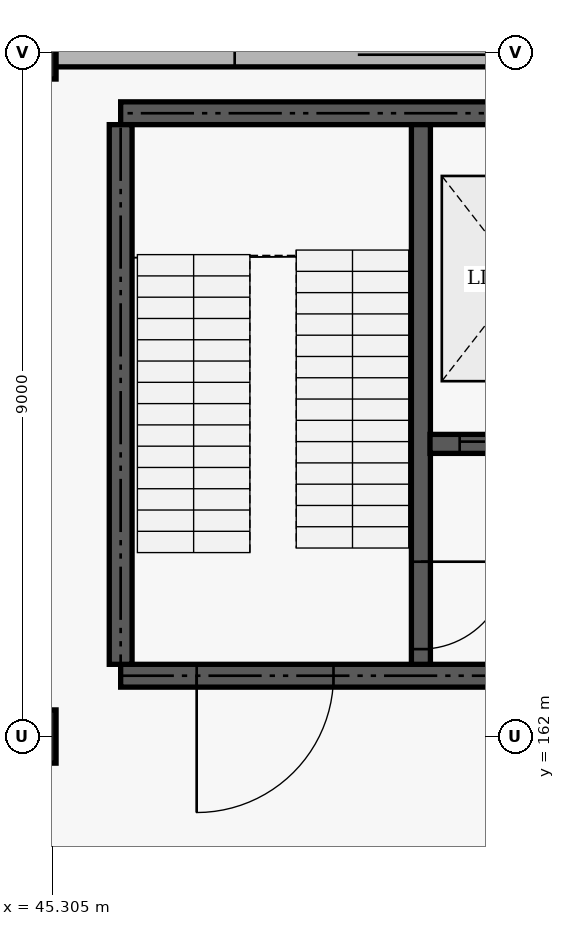
"""IFC4 building model, lengths in metres.
Left out: names, types, materials, properties, quantities, classifications, styles, units other than length and angle.
Written with IfcOpenShell. Run it as: python <this file> out.ifc"""

import sys

from ifc_helpers import new_model, si_unit, direction, frame, frame_2d, origin, origin_2d, place, context, subcontext, project, spatial, rectangle, extrude, element, fill, save


model = new_model("IFC4")
c1 = context("Model", 3, precision=1e-05, world=origin(), true_north=direction((0.0, 1.0)))
c2 = subcontext(c1, "Body", "Model", "MODEL_VIEW")
j1 = project(units=[si_unit("LENGTHUNIT", "METRE"), si_unit("PLANEANGLEUNIT", "RADIAN")], contexts=[c1])
p1 = place(None, origin())
s1 = spatial("IfcSite", under=j1, at=p1, CompositionType="ELEMENT")
p2 = place(p1, origin())
s2 = spatial("IfcBuilding", under=s1, at=p2, CompositionType="ELEMENT")
p3 = place(p2, origin())
s3 = spatial("IfcBuildingStorey", under=s2, at=p3, CompositionType="ELEMENT", Elevation=0.0)
for number, where, z_axis, x_axis in (
    (1, (45.0, 162.0, 0.0), (0.0, 0.0, 1.0), (1.0, 0.0, 0.0)),
    (2, (45.0, 171.0, 0.0), (0.0, 0.0, 1.0), (1.0, 0.0, 0.0)),
):
    element("IfcColumn", number, at=place(p3, frame(where, z_axis=z_axis, x_axis=x_axis)), inside=s3, PredefinedType="COLUMN", context=c2, shape_type="SweptSolid", body=[
        extrude(rectangle(XDim=0.7, YDim=0.7, at=origin_2d()), origin(), (0.0, 0.0, 1.0), 5.4),
    ])
p4 = place(p3, frame((45.06, 171.0, 0.0), z_axis=(0.0, 0.0, 1.0), x_axis=(1.0, 0.0, 0.0)))
e3 = element("IfcWall", 3, at=p4, inside=s3, PredefinedType="SOLIDWALL", context=c2, shape_type="SweptSolid", body=[
    extrude(rectangle(XDim=8.88, YDim=0.38, at=frame_2d((4.44, 0.0))), origin(), (0.0, 0.0, 1.0), 4.55),
])
p5 = place(p4, frame((2.64, 0.0, 0.0)))
e4 = element("IfcOpeningElement", 4, at=p5, cuts=e3, PredefinedType="OPENING", context=c2, shape_type="SweptSolid", body=[
    extrude(rectangle(XDim=3.6, YDim=4.0, at=frame_2d((1.8, 2.0))), frame((0.0, 0.2, 0.0), z_axis=(0.0, -1.0, 0.0), x_axis=(1.0, 0.0, 0.0)), (0.0, 0.0, 1.0), 0.4),
])
p6 = place(p3, frame((46.2, 162.8, 0.0), z_axis=(0.0, 0.0, 1.0), x_axis=(1.0, 0.0, 0.0)))
e5 = element("IfcWall", 5, at=p6, inside=s3, PredefinedType="SHEAR", context=c2, shape_type="SweptSolid", body=[
    extrude(rectangle(XDim=6.6, YDim=0.3, at=frame_2d((3.3, 0.0))), origin(), (0.0, 0.0, 1.0), 5.4),
])
p7 = place(p6, frame((1.0, 0.0, 0.0)))
e6 = element("IfcOpeningElement", 6, at=p7, cuts=e5, PredefinedType="OPENING", context=c2, shape_type="SweptSolid", body=[
    extrude(rectangle(XDim=1.8, YDim=2.15, at=frame_2d((0.9, 1.075))), frame((0.0, 0.16, 0.0), z_axis=(0.0, -1.0, 0.0), x_axis=(1.0, 0.0, 0.0)), (0.0, 0.0, 1.0), 0.32),
])
p8 = place(p3, frame((46.2, 170.2, 0.0), z_axis=(0.0, 0.0, 1.0), x_axis=(1.0, 0.0, 0.0)))
e7 = element("IfcWall", 7, at=p8, inside=s3, PredefinedType="SHEAR", context=c2, shape_type="SweptSolid", body=[
    extrude(rectangle(XDim=6.6, YDim=0.3, at=frame_2d((3.3, 0.0))), origin(), (0.0, 0.0, 1.0), 5.4),
])
p9 = place(p3, frame((46.2, 162.95, 0.0), z_axis=(0.0, 0.0, 1.0), x_axis=(0.0, 1.0, 0.0)))
e8 = element("IfcWall", 8, at=p9, inside=s3, PredefinedType="SHEAR", context=c2, shape_type="SweptSolid", body=[
    extrude(rectangle(XDim=7.1, YDim=0.3, at=frame_2d((3.55, 0.0))), origin(), (0.0, 0.0, 1.0), 5.4),
])
p10 = place(p3, frame((50.15, 162.95, 0.0), z_axis=(0.0, 0.0, 1.0), x_axis=(0.0, 1.0, 0.0)))
e9 = element("IfcWall", 9, at=p10, inside=s3, PredefinedType="SHEAR", context=c2, shape_type="SweptSolid", body=[
    extrude(rectangle(XDim=7.1, YDim=0.25, at=frame_2d((3.55, 0.0))), origin(), (0.0, 0.0, 1.0), 5.4),
])
p11 = place(p10, frame((0.2, 0.0, 0.0)))
e10 = element("IfcOpeningElement", 10, at=p11, cuts=e9, PredefinedType="OPENING", context=c2, shape_type="SweptSolid", body=[
    extrude(rectangle(XDim=1.15, YDim=2.15, at=frame_2d((0.575, 1.075))), frame((0.0, 0.135, 0.0), z_axis=(0.0, -1.0, 0.0), x_axis=(1.0, 0.0, 0.0)), (0.0, 0.0, 1.0), 0.27),
])
p12 = place(p3, frame((50.27, 165.85, 0.0), z_axis=(0.0, 0.0, 1.0), x_axis=(1.0, 0.0, 0.0)))
e11 = element("IfcWall", 11, at=p12, inside=s3, PredefinedType="SHEAR", context=c2, shape_type="SweptSolid", body=[
    extrude(rectangle(XDim=2.38, YDim=0.25, at=frame_2d((1.19, 0.0))), origin(), (0.0, 0.0, 1.0), 5.4),
])
p13 = place(p12, frame((0.39, 0.0, 0.0)))
e12 = element("IfcOpeningElement", 12, at=p13, cuts=e11, PredefinedType="OPENING", context=c2, shape_type="SweptSolid", body=[
    extrude(rectangle(XDim=1.6, YDim=2.3, at=frame_2d((0.8, 1.15))), frame((0.0, 0.135, 0.0), z_axis=(0.0, -1.0, 0.0), x_axis=(1.0, 0.0, 0.0)), (0.0, 0.0, 1.0), 0.27),
])
p14 = place(p5, origin())
e13 = element("IfcDoor", 13, at=p14, inside=s3, OperationType="ROLLINGUP", PredefinedType="GATE", context=c2, shape_type="SweptSolid", body=[
    extrude(rectangle(XDim=3.6, YDim=4.0, at=frame_2d((1.8, 2.0))), frame((0.0, 0.025, 0.0), z_axis=(0.0, -1.0, 0.0), x_axis=(1.0, 0.0, 0.0)), (0.0, 0.0, 1.0), 0.05),
])
fill(e4, e13)
p15 = place(p11, origin())
e14 = element("IfcDoor", 14, at=p15, inside=s3, OperationType="SINGLE_SWING_RIGHT", PredefinedType="DOOR", context=c2, shape_type="SweptSolid", body=[
    extrude(rectangle(XDim=1.15, YDim=2.15, at=frame_2d((0.575, 1.075))), frame((0.0, 0.025, 0.0), z_axis=(0.0, -1.0, 0.0), x_axis=(1.0, 0.0, 0.0)), (0.0, 0.0, 1.0), 0.05),
])
fill(e10, e14)
p16 = place(p7, frame((1.8, 0.0, 0.0), z_axis=(0.0, 0.0, 1.0), x_axis=(-1.0, 0.0, 0.0)))
e15 = element("IfcDoor", 15, at=p16, inside=s3, OperationType="DOUBLE_DOOR_SINGLE_SWING", PredefinedType="DOOR", context=c2, shape_type="SweptSolid", body=[
    extrude(rectangle(XDim=1.8, YDim=2.15, at=frame_2d((0.9, 1.075))), frame((0.0, 0.025, 0.0), z_axis=(0.0, -1.0, 0.0), x_axis=(1.0, 0.0, 0.0)), (0.0, 0.0, 1.0), 0.05),
])
fill(e6, e15)
p17 = place(p13, origin())
e16 = element("IfcDoor", 16, at=p17, inside=s3, OperationType="SLIDING_TO_LEFT", PredefinedType="DOOR", context=c2, shape_type="SweptSolid", body=[
    extrude(rectangle(XDim=1.6, YDim=2.3, at=frame_2d((0.8, 1.15))), frame((0.0, 0.025, 0.0), z_axis=(0.0, -1.0, 0.0), x_axis=(1.0, 0.0, 0.0)), (0.0, 0.0, 1.0), 0.05),
])
fill(e12, e16)
save(model, sys.argv[1])
